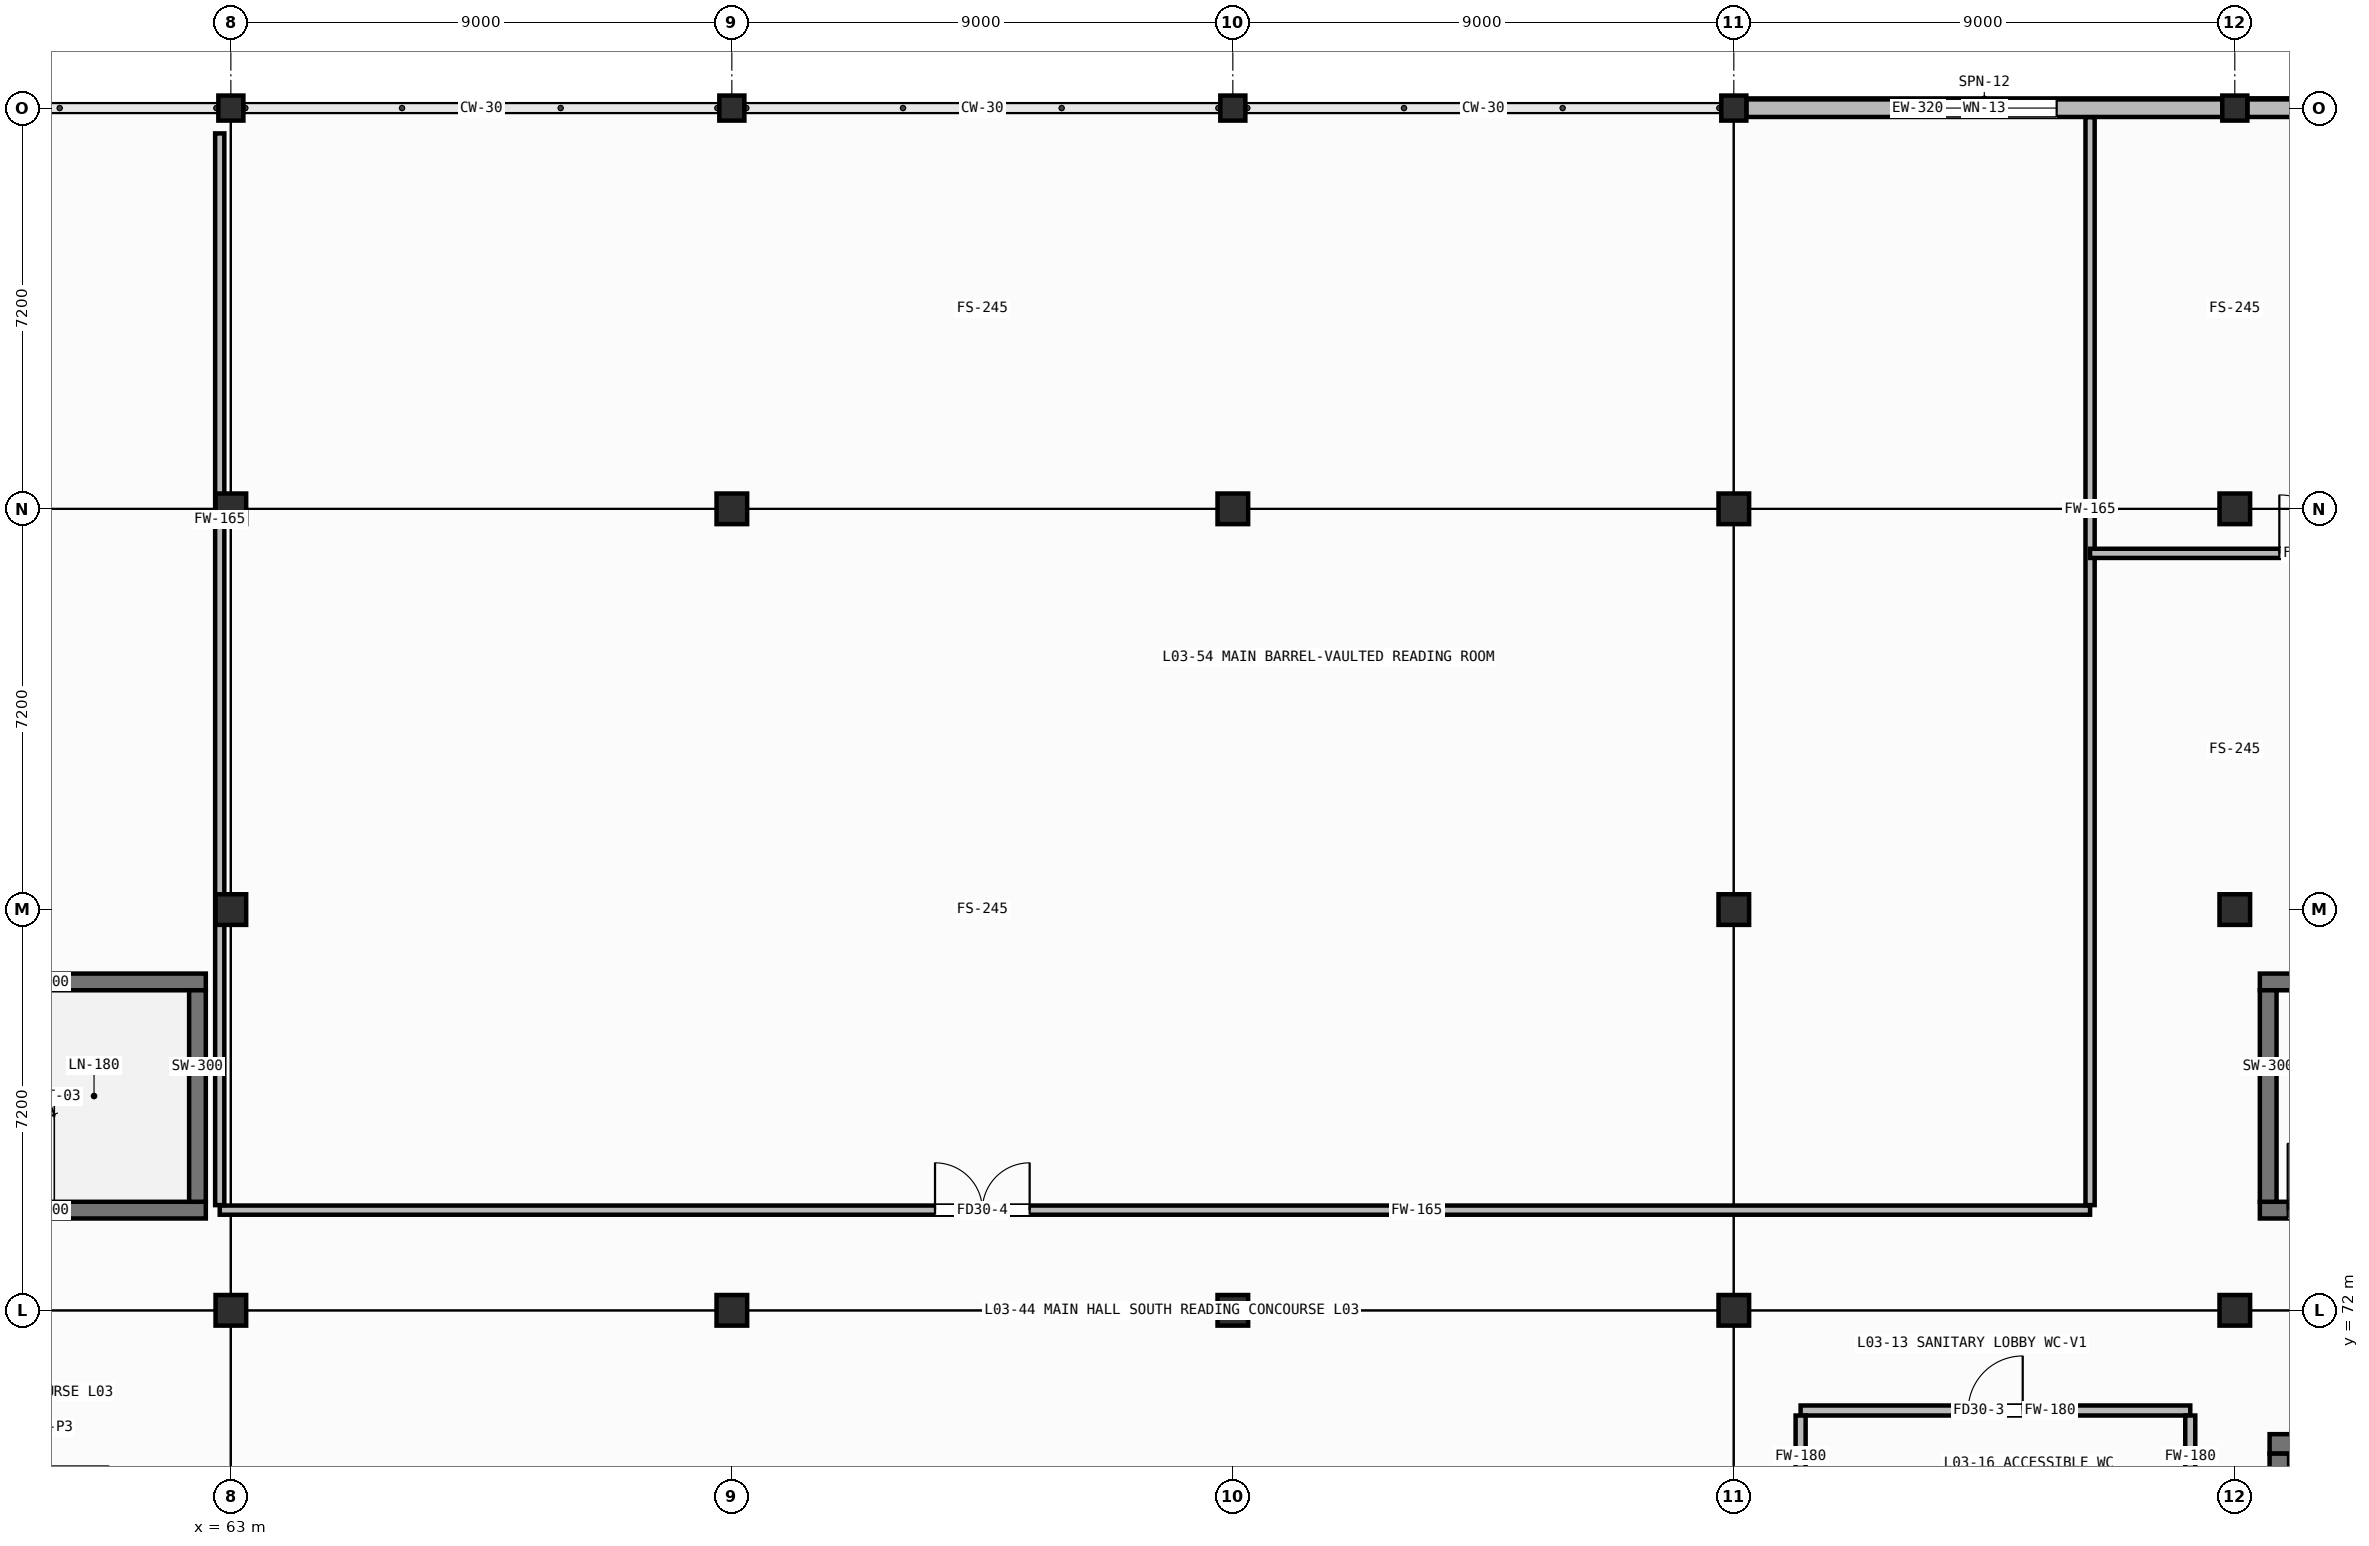
"""IFC4 building model, lengths in metres.
Left out: names, types, materials, properties, quantities, classifications, styles, units other than length and angle.
Written with IfcOpenShell. Run it as: python <this file> out.ifc"""

import sys

from ifc_helpers import new_model, si_unit, direction, frame, frame_2d, origin, origin_2d, place, context, subcontext, project, spatial, rectangle, hollow_rectangle, extrude, element, fill, save


model = new_model("IFC4")
c1 = context("Model", 3, precision=1e-05, world=origin(), true_north=direction((0.0, 1.0)))
c2 = subcontext(c1, "Body", "Model", "MODEL_VIEW")
j1 = project(units=[si_unit("LENGTHUNIT", "METRE"), si_unit("PLANEANGLEUNIT", "RADIAN")], contexts=[c1])
p1 = place(None, origin())
s1 = spatial("IfcSite", under=j1, at=p1, CompositionType="ELEMENT")
p2 = place(p1, origin())
s2 = spatial("IfcBuilding", under=s1, at=p2, CompositionType="ELEMENT")
p3 = place(p2, frame((0.0, 0.0, 8.8)))
s3 = spatial("IfcBuildingStorey", under=s2, at=p3, CompositionType="ELEMENT", Elevation=8.8)
for number, where, z_axis, x_axis in (
    (1, (63.0, 72.0, 0.0), (0.0, 0.0, 1.0), (1.0, 0.0, 0.0)),
    (2, (63.0, 79.2, 0.0), (0.0, 0.0, 1.0), (1.0, 0.0, 0.0)),
    (3, (63.0, 86.4, 0.0), (0.0, 0.0, 1.0), (1.0, 0.0, 0.0)),
):
    element("IfcColumn", number, at=place(p3, frame(where, z_axis=z_axis, x_axis=x_axis)), inside=s3, PredefinedType="COLUMN", context=c2, shape_type="SweptSolid", body=[
        extrude(hollow_rectangle(XDim=0.55, YDim=0.55, WallThickness=0.022, at=origin_2d()), origin(), (0.0, 0.0, 1.0), 4.0),
    ])
p4 = place(p3, frame((63.0, 93.6, 0.0), z_axis=(0.0, 0.0, 1.0), x_axis=(1.0, 0.0, 0.0)))
e4 = element("IfcColumn", 4, at=p4, inside=s3, PredefinedType="COLUMN", context=c2, shape_type="SweptSolid", body=[
    extrude(hollow_rectangle(XDim=0.45, YDim=0.45, WallThickness=0.019, at=origin_2d()), origin(), (0.0, 0.0, 1.0), 4.0),
])
for number, where, z_axis, x_axis in (
    (5, (72.0, 72.0, 0.0), (0.0, 0.0, 1.0), (1.0, 0.0, 0.0)),
    (6, (72.0, 86.4, 0.0), (0.0, 0.0, 1.0), (1.0, 0.0, 0.0)),
):
    element("IfcColumn", number, at=place(p3, frame(where, z_axis=z_axis, x_axis=x_axis)), inside=s3, PredefinedType="COLUMN", context=c2, shape_type="SweptSolid", body=[
        extrude(hollow_rectangle(XDim=0.55, YDim=0.55, WallThickness=0.022, at=origin_2d()), origin(), (0.0, 0.0, 1.0), 3.745),
    ])
p5 = place(p3, frame((72.0, 93.6, 0.0), z_axis=(0.0, 0.0, 1.0), x_axis=(1.0, 0.0, 0.0)))
e7 = element("IfcColumn", 7, at=p5, inside=s3, PredefinedType="COLUMN", context=c2, shape_type="SweptSolid", body=[
    extrude(hollow_rectangle(XDim=0.45, YDim=0.45, WallThickness=0.019, at=origin_2d()), origin(), (0.0, 0.0, 1.0), 3.745),
])
for number, where, z_axis, x_axis in (
    (8, (81.0, 72.0, 0.0), (0.0, 0.0, 1.0), (1.0, 0.0, 0.0)),
    (9, (81.0, 86.4, 0.0), (0.0, 0.0, 1.0), (1.0, 0.0, 0.0)),
):
    element("IfcColumn", number, at=place(p3, frame(where, z_axis=z_axis, x_axis=x_axis)), inside=s3, PredefinedType="COLUMN", context=c2, shape_type="SweptSolid", body=[
        extrude(hollow_rectangle(XDim=0.55, YDim=0.55, WallThickness=0.022, at=origin_2d()), origin(), (0.0, 0.0, 1.0), 3.745),
    ])
p6 = place(p3, frame((81.0, 93.6, 0.0), z_axis=(0.0, 0.0, 1.0), x_axis=(1.0, 0.0, 0.0)))
e10 = element("IfcColumn", 10, at=p6, inside=s3, PredefinedType="COLUMN", context=c2, shape_type="SweptSolid", body=[
    extrude(hollow_rectangle(XDim=0.45, YDim=0.45, WallThickness=0.019, at=origin_2d()), origin(), (0.0, 0.0, 1.0), 3.745),
])
for number, where, z_axis, x_axis in (
    (11, (90.0, 72.0, 0.0), (0.0, 0.0, 1.0), (1.0, 0.0, 0.0)),
    (12, (90.0, 79.2, 0.0), (0.0, 0.0, 1.0), (1.0, 0.0, 0.0)),
    (13, (90.0, 86.4, 0.0), (0.0, 0.0, 1.0), (1.0, 0.0, 0.0)),
):
    element("IfcColumn", number, at=place(p3, frame(where, z_axis=z_axis, x_axis=x_axis)), inside=s3, PredefinedType="COLUMN", context=c2, shape_type="SweptSolid", body=[
        extrude(hollow_rectangle(XDim=0.55, YDim=0.55, WallThickness=0.022, at=origin_2d()), origin(), (0.0, 0.0, 1.0), 4.0),
    ])
p7 = place(p3, frame((90.0, 93.6, 0.0), z_axis=(0.0, 0.0, 1.0), x_axis=(1.0, 0.0, 0.0)))
e14 = element("IfcColumn", 14, at=p7, inside=s3, PredefinedType="COLUMN", context=c2, shape_type="SweptSolid", body=[
    extrude(hollow_rectangle(XDim=0.45, YDim=0.45, WallThickness=0.019, at=origin_2d()), origin(), (0.0, 0.0, 1.0), 4.0),
])
for number, where, z_axis, x_axis in (
    (15, (99.0, 72.0, 0.0), (0.0, 0.0, 1.0), (1.0, 0.0, 0.0)),
    (16, (99.0, 79.2, 0.0), (0.0, 0.0, 1.0), (1.0, 0.0, 0.0)),
    (17, (99.0, 86.4, 0.0), (0.0, 0.0, 1.0), (1.0, 0.0, 0.0)),
):
    element("IfcColumn", number, at=place(p3, frame(where, z_axis=z_axis, x_axis=x_axis)), inside=s3, PredefinedType="COLUMN", context=c2, shape_type="SweptSolid", body=[
        extrude(hollow_rectangle(XDim=0.55, YDim=0.55, WallThickness=0.022, at=origin_2d()), origin(), (0.0, 0.0, 1.0), 3.745),
    ])
p8 = place(p3, frame((99.0, 93.6, 0.0), z_axis=(0.0, 0.0, 1.0), x_axis=(1.0, 0.0, 0.0)))
e18 = element("IfcColumn", 18, at=p8, inside=s3, PredefinedType="COLUMN", context=c2, shape_type="SweptSolid", body=[
    extrude(hollow_rectangle(XDim=0.45, YDim=0.45, WallThickness=0.019, at=origin_2d()), origin(), (0.0, 0.0, 1.0), 3.745),
])
p9 = place(p3, frame((98.775, 93.6, 0.0), z_axis=(0.0, 0.0, 1.0), x_axis=(-1.0, 0.0, 0.0)))
e19 = element("IfcWall", 19, at=p9, inside=s3, PredefinedType="STANDARD", context=c2, shape_type="SweptSolid", body=[
    extrude(rectangle(XDim=8.55, YDim=0.32, at=frame_2d((4.275, 0.0))), origin(), (0.0, 0.0, 1.0), 3.295),
])
p10 = place(p9, frame((2.975, 0.0, 0.85)))
e20 = element("IfcOpeningElement", 20, at=p10, cuts=e19, PredefinedType="OPENING", context=c2, shape_type="SweptSolid", body=[
    extrude(rectangle(XDim=2.6, YDim=1.6, at=frame_2d((1.3, 0.8))), frame((0.0, 0.172, 0.0), z_axis=(0.0, -1.0, 0.0), x_axis=(1.0, 0.0, 0.0)), (0.0, 0.0, 1.0), 0.344),
])
p11 = place(p3, frame((107.775, 93.6, 0.0), z_axis=(0.0, 0.0, 1.0), x_axis=(-1.0, 0.0, 0.0)))
e21 = element("IfcWall", 21, at=p11, inside=s3, PredefinedType="STANDARD", context=c2, shape_type="SweptSolid", body=[
    extrude(rectangle(XDim=8.55, YDim=0.32, at=frame_2d((4.275, 0.0))), origin(), (0.0, 0.0, 1.0), 3.295),
])
p12 = place(p11, frame((2.975, 0.0, 0.85)))
e22 = element("IfcOpeningElement", 22, at=p12, cuts=e21, PredefinedType="OPENING", context=c2, shape_type="SweptSolid", body=[
    extrude(rectangle(XDim=2.6, YDim=1.6, at=frame_2d((1.3, 0.8))), frame((0.0, 0.172, 0.0), z_axis=(0.0, -1.0, 0.0), x_axis=(1.0, 0.0, 0.0)), (0.0, 0.0, 1.0), 0.344),
])
p13 = place(p3, frame((54.45, 73.8, 0.0), z_axis=(0.0, 0.0, 1.0), x_axis=(1.0, 0.0, 0.0)))
e23 = element("IfcWall", 23, at=p13, inside=s3, PredefinedType="SHEAR", context=c2, shape_type="SweptSolid", body=[
    extrude(rectangle(XDim=8.1, YDim=0.3, at=frame_2d((4.05, 0.0))), origin(), (0.0, 0.0, 1.0), 3.745),
])
p14 = place(p13, frame((0.5, 0.0, 0.0)))
e24 = element("IfcOpeningElement", 24, at=p14, cuts=e23, PredefinedType="OPENING", context=c2, shape_type="SweptSolid", body=[
    extrude(rectangle(XDim=1.2, YDim=2.1, at=frame_2d((0.6, 1.05))), frame((0.0, 0.162, 0.0), z_axis=(0.0, -1.0, 0.0), x_axis=(1.0, 0.0, 0.0)), (0.0, 0.0, 1.0), 0.324),
])
p15 = place(p3, frame((54.45, 77.9, 0.0), z_axis=(0.0, 0.0, 1.0), x_axis=(1.0, 0.0, 0.0)))
e25 = element("IfcWall", 25, at=p15, inside=s3, PredefinedType="SHEAR", context=c2, shape_type="SweptSolid", body=[
    extrude(rectangle(XDim=8.1, YDim=0.3, at=frame_2d((4.05, 0.0))), origin(), (0.0, 0.0, 1.0), 3.745),
])
p16 = place(p3, frame((62.4, 73.95, 0.0), z_axis=(0.0, 0.0, 1.0), x_axis=(0.0, 1.0, 0.0)))
e26 = element("IfcWall", 26, at=p16, inside=s3, PredefinedType="SHEAR", context=c2, shape_type="SweptSolid", body=[
    extrude(rectangle(XDim=3.8, YDim=0.3, at=frame_2d((1.9, 0.0))), origin(), (0.0, 0.0, 1.0), 3.745),
])
p17 = place(p3, frame((99.45, 73.8, 0.0), z_axis=(0.0, 0.0, 1.0), x_axis=(1.0, 0.0, 0.0)))
e27 = element("IfcWall", 27, at=p17, inside=s3, PredefinedType="SHEAR", context=c2, shape_type="SweptSolid", body=[
    extrude(rectangle(XDim=8.1, YDim=0.3, at=frame_2d((4.05, 0.0))), origin(), (0.0, 0.0, 1.0), 3.745),
])
p18 = place(p17, frame((0.5, 0.0, 0.0)))
e28 = element("IfcOpeningElement", 28, at=p18, cuts=e27, PredefinedType="OPENING", context=c2, shape_type="SweptSolid", body=[
    extrude(rectangle(XDim=1.2, YDim=2.1, at=frame_2d((0.6, 1.05))), frame((0.0, 0.162, 0.0), z_axis=(0.0, -1.0, 0.0), x_axis=(1.0, 0.0, 0.0)), (0.0, 0.0, 1.0), 0.324),
])
p19 = place(p3, frame((99.45, 77.9, 0.0), z_axis=(0.0, 0.0, 1.0), x_axis=(1.0, 0.0, 0.0)))
e29 = element("IfcWall", 29, at=p19, inside=s3, PredefinedType="SHEAR", context=c2, shape_type="SweptSolid", body=[
    extrude(rectangle(XDim=8.1, YDim=0.3, at=frame_2d((4.05, 0.0))), origin(), (0.0, 0.0, 1.0), 3.745),
])
p20 = place(p3, frame((99.6, 73.95, 0.0), z_axis=(0.0, 0.0, 1.0), x_axis=(0.0, 1.0, 0.0)))
e30 = element("IfcWall", 30, at=p20, inside=s3, PredefinedType="SHEAR", context=c2, shape_type="SweptSolid", body=[
    extrude(rectangle(XDim=3.8, YDim=0.3, at=frame_2d((1.9, 0.0))), origin(), (0.0, 0.0, 1.0), 3.745),
])
p21 = place(p3, frame((99.625, 69.6, 0.0), z_axis=(0.0, 0.0, 1.0), x_axis=(1.0, 0.0, 0.0)))
e31 = element("IfcWall", 31, at=p21, inside=s3, PredefinedType="SHEAR", context=c2, shape_type="SweptSolid", body=[
    extrude(rectangle(XDim=2.95, YDim=0.35, at=frame_2d((1.475, 0.0))), origin(), (0.0, 0.0, 1.0), 3.745),
])
p22 = place(p21, frame((0.775, 0.0, 0.0)))
e32 = element("IfcOpeningElement", 32, at=p22, cuts=e31, PredefinedType="OPENING", context=c2, shape_type="SweptSolid", body=[
    extrude(rectangle(XDim=1.4, YDim=2.15, at=frame_2d((0.7, 1.075))), frame((0.0, 0.187, 0.0), z_axis=(0.0, -1.0, 0.0), x_axis=(1.0, 0.0, 0.0)), (0.0, 0.0, 1.0), 0.374),
])
p23 = place(p3, frame((99.8, 66.375, 0.0), z_axis=(0.0, 0.0, 1.0), x_axis=(0.0, 1.0, 0.0)))
e33 = element("IfcWall", 33, at=p23, inside=s3, PredefinedType="SHEAR", context=c2, shape_type="SweptSolid", body=[
    extrude(rectangle(XDim=3.05, YDim=0.35, at=frame_2d((1.525, 0.0))), origin(), (0.0, 0.0, 1.0), 3.745),
])
p24 = place(p3, frame((91.2, 70.2, 0.0), z_axis=(0.0, 0.0, 1.0), x_axis=(1.0, 0.0, 0.0)))
e34 = element("IfcWall", 34, at=p24, inside=s3, PredefinedType="PARTITIONING", context=c2, shape_type="SweptSolid", body=[
    extrude(rectangle(XDim=7.0, YDim=0.18, at=frame_2d((3.5, 0.0))), origin(), (0.0, 0.0, 1.0), 3.745),
])
p25 = place(p24, frame((3.01, 0.0, 0.0)))
e35 = element("IfcOpeningElement", 35, at=p25, cuts=e34, PredefinedType="OPENING", context=c2, shape_type="SweptSolid", body=[
    extrude(rectangle(XDim=0.98, YDim=2.02, at=frame_2d((0.49, 1.01))), frame((0.0, 0.102, 0.0), z_axis=(0.0, -1.0, 0.0), x_axis=(1.0, 0.0, 0.0)), (0.0, 0.0, 1.0), 0.204),
])
for number, where, z_axis, x_axis in (
    (36, (91.2, 68.09, 0.0), (0.0, 0.0, 1.0), (0.0, 1.0, 0.0)),
    (37, (98.2, 68.09, 0.0), (0.0, 0.0, 1.0), (0.0, 1.0, 0.0)),
):
    element("IfcWall", number, at=place(p3, frame(where, z_axis=z_axis, x_axis=x_axis)), inside=s3, PredefinedType="PARTITIONING", context=c2, shape_type="SweptSolid", body=[
        extrude(rectangle(XDim=2.02, YDim=0.18, at=frame_2d((1.01, 0.0))), origin(), (0.0, 0.0, 1.0), 3.745),
    ])
p26 = place(p3, frame((62.8, 73.8, 0.0), z_axis=(0.0, 0.0, 1.0), x_axis=(1.0, 0.0, 0.0)))
e38 = element("IfcWall", 38, at=p26, inside=s3, PredefinedType="PARTITIONING", context=c2, shape_type="SweptSolid", body=[
    extrude(rectangle(XDim=33.6, YDim=0.165, at=frame_2d((16.8, 0.0))), origin(), (0.0, 0.0, 1.0), 3.745),
])
p27 = place(p26, frame((12.85, 0.0, 0.0)))
e39 = element("IfcOpeningElement", 39, at=p27, cuts=e38, PredefinedType="OPENING", context=c2, shape_type="SweptSolid", body=[
    extrude(rectangle(XDim=1.7, YDim=2.12, at=frame_2d((0.85, 1.06))), frame((0.0, 0.094, 0.0), z_axis=(0.0, -1.0, 0.0), x_axis=(1.0, 0.0, 0.0)), (0.0, 0.0, 1.0), 0.189),
])
p28 = place(p3, frame((62.8, 73.89, 0.0), z_axis=(0.0, 0.0, 1.0), x_axis=(0.0, 1.0, 0.0)))
e40 = element("IfcWall", 40, at=p28, inside=s3, PredefinedType="PARTITIONING", context=c2, shape_type="SweptSolid", body=[
    extrude(rectangle(XDim=19.255, YDim=0.165, at=frame_2d((9.627, 0.0))), origin(), (0.0, 0.0, 1.0), 3.025),
])
p29 = place(p3, frame((96.4, 73.89, 0.0), z_axis=(0.0, 0.0, 1.0), x_axis=(0.0, 1.0, 0.0)))
e41 = element("IfcWall", 41, at=p29, inside=s3, PredefinedType="PARTITIONING", context=c2, shape_type="SweptSolid", body=[
    extrude(rectangle(XDim=19.545, YDim=0.165, at=frame_2d((9.772, 0.0))), origin(), (0.0, 0.0, 1.0), 3.745),
])
p30 = place(p3, frame((96.4, 85.6, 0.0), z_axis=(0.0, 0.0, 1.0), x_axis=(1.0, 0.0, 0.0)))
e42 = element("IfcWall", 42, at=p30, inside=s3, PredefinedType="PARTITIONING", context=c2, shape_type="SweptSolid", body=[
    extrude(rectangle(XDim=11.565, YDim=0.165, at=frame_2d((5.783, 0.0))), origin(), (0.0, 0.0, 1.0), 3.745),
])
p31 = place(p30, frame((3.4, 0.0, 0.0)))
e43 = element("IfcOpeningElement", 43, at=p31, cuts=e42, PredefinedType="OPENING", context=c2, shape_type="SweptSolid", body=[
    extrude(rectangle(XDim=1.05, YDim=2.1, at=frame_2d((0.525, 1.05))), frame((0.0, 0.094, 0.0), z_axis=(0.0, -1.0, 0.0), x_axis=(1.0, 0.0, 0.0)), (0.0, 0.0, 1.0), 0.189),
])
p32 = place(p10, origin())
e44 = element("IfcWindow", 44, at=p32, inside=s3, PartitioningType="DOUBLE_PANEL_VERTICAL", PredefinedType="WINDOW", context=c2, shape_type="SweptSolid", body=[
    extrude(rectangle(XDim=2.6, YDim=1.6, at=frame_2d((1.3, 0.8))), frame((0.0, 0.03, 0.0), z_axis=(0.0, -1.0, 0.0), x_axis=(1.0, 0.0, 0.0)), (0.0, 0.0, 1.0), 0.06),
])
fill(e20, e44)
p33 = place(p18, origin())
e45 = element("IfcDoor", 45, at=p33, inside=s3, OperationType="SINGLE_SWING_LEFT", PredefinedType="DOOR", context=c2, shape_type="SweptSolid", body=[
    extrude(rectangle(XDim=1.2, YDim=2.1, at=frame_2d((0.6, 1.05))), frame((0.0, 0.025, 0.0), z_axis=(0.0, -1.0, 0.0), x_axis=(1.0, 0.0, 0.0)), (0.0, 0.0, 1.0), 0.05),
])
fill(e28, e45)
p34 = place(p25, origin())
e46 = element("IfcDoor", 46, at=p34, inside=s3, OperationType="SINGLE_SWING_RIGHT", PredefinedType="DOOR", context=c2, shape_type="SweptSolid", body=[
    extrude(rectangle(XDim=0.98, YDim=2.02, at=frame_2d((0.49, 1.01))), frame((0.0, 0.025, 0.0), z_axis=(0.0, -1.0, 0.0), x_axis=(1.0, 0.0, 0.0)), (0.0, 0.0, 1.0), 0.05),
])
fill(e35, e46)
p35 = place(p27, origin())
e47 = element("IfcDoor", 47, at=p35, inside=s3, OperationType="DOUBLE_DOOR_SINGLE_SWING", PredefinedType="DOOR", context=c2, shape_type="SweptSolid", body=[
    extrude(rectangle(XDim=1.7, YDim=2.12, at=frame_2d((0.85, 1.06))), frame((0.0, 0.025, 0.0), z_axis=(0.0, -1.0, 0.0), x_axis=(1.0, 0.0, 0.0)), (0.0, 0.0, 1.0), 0.05),
])
fill(e39, e47)
p36 = place(p31, origin())
e48 = element("IfcDoor", 48, at=p36, inside=s3, OperationType="SINGLE_SWING_LEFT", PredefinedType="DOOR", context=c2, shape_type="SweptSolid", body=[
    extrude(rectangle(XDim=1.05, YDim=2.1, at=frame_2d((0.525, 1.05))), frame((0.0, 0.025, 0.0), z_axis=(0.0, -1.0, 0.0), x_axis=(1.0, 0.0, 0.0)), (0.0, 0.0, 1.0), 0.05),
])
fill(e43, e48)
save(model, sys.argv[1])
